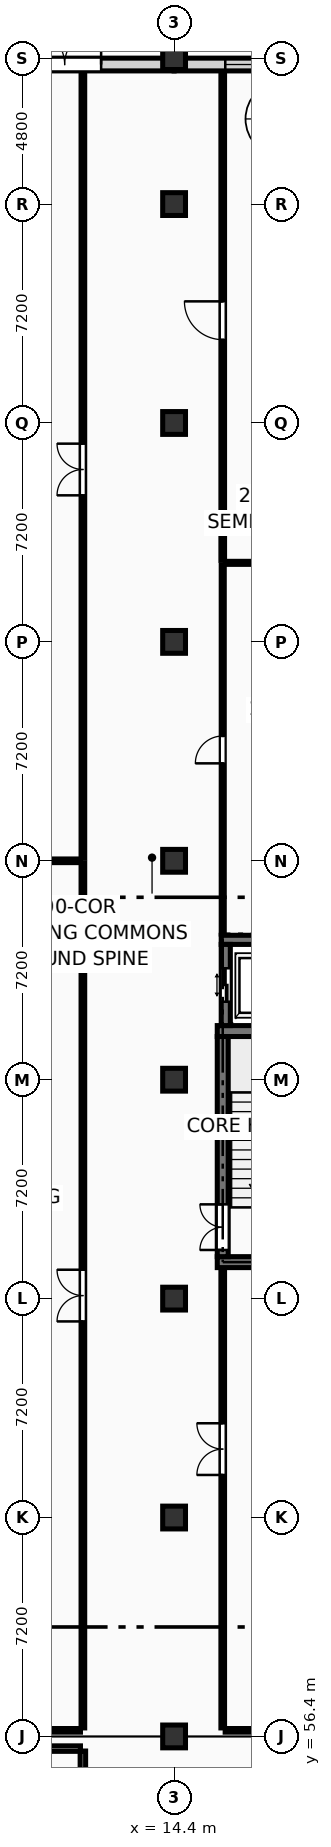
"""IFC4 building model, lengths in metres.
Left out: names, types, materials, properties, quantities, classifications, styles, units other than length and angle.
Written with IfcOpenShell. Run it as: python <this file> out.ifc"""

import sys

from ifc_helpers import new_model, si_unit, direction, frame, frame_2d, origin, origin_2d, place, context, subcontext, project, spatial, rectangle, extrude, element, fill, save


model = new_model("IFC4")
c1 = context("Model", 3, precision=1e-05, world=origin(), true_north=direction((0.0, 1.0)))
c2 = subcontext(c1, "Body", "Model", "MODEL_VIEW")
j1 = project(units=[si_unit("LENGTHUNIT", "METRE"), si_unit("PLANEANGLEUNIT", "RADIAN")], contexts=[c1])
p1 = place(None, origin())
s1 = spatial("IfcSite", under=j1, at=p1, CompositionType="ELEMENT")
p2 = place(p1, origin())
s2 = spatial("IfcBuilding", under=s1, at=p2, CompositionType="ELEMENT")
p3 = place(p2, origin())
s3 = spatial("IfcBuildingStorey", under=s2, at=p3, CompositionType="ELEMENT", Elevation=0.0)
for number, where, z_axis, x_axis in (
    (1, (14.4, 56.4, 0.0), (0.0, 0.0, 1.0), (1.0, 0.0, 0.0)),
    (2, (14.4, 63.6, 0.0), (0.0, 0.0, 1.0), (1.0, 0.0, 0.0)),
    (3, (14.4, 70.8, 0.0), (0.0, 0.0, 1.0), (1.0, 0.0, 0.0)),
    (4, (14.4, 78.0, 0.0), (0.0, 0.0, 1.0), (1.0, 0.0, 0.0)),
    (5, (14.4, 85.2, 0.0), (0.0, 0.0, 1.0), (1.0, 0.0, 0.0)),
    (6, (14.4, 92.4, 0.0), (0.0, 0.0, 1.0), (1.0, 0.0, 0.0)),
    (7, (14.4, 99.6, 0.0), (0.0, 0.0, 1.0), (1.0, 0.0, 0.0)),
    (8, (14.4, 106.8, 0.0), (0.0, 0.0, 1.0), (1.0, 0.0, 0.0)),
    (9, (14.4, 111.6, 0.0), (0.0, 0.0, 1.0), (1.0, 0.0, 0.0)),
):
    element("IfcColumn", number, at=place(p3, frame(where, z_axis=z_axis, x_axis=x_axis)), inside=s3, PredefinedType="COLUMN", context=c2, shape_type="SweptSolid", body=[
        extrude(rectangle(XDim=0.75, YDim=0.75, at=origin_2d()), origin(), (0.0, 0.0, 1.0), 4.5),
    ])
p4 = place(p3, frame((7.2, 111.39, 0.0), z_axis=(0.0, 0.0, 1.0), x_axis=(1.0, 0.0, 0.0)))
e10 = element("IfcWall", 10, at=p4, inside=s3, PredefinedType="SOLIDWALL", context=c2, shape_type="SweptSolid", body=[
    extrude(rectangle(XDim=7.2, YDim=0.42, at=frame_2d((3.6, 0.0))), origin(), (0.0, 0.0, 1.0), 3.62),
])
p5 = place(p4, frame((2.4, 0.0, 0.0)))
e11 = element("IfcOpeningElement", 11, at=p5, cuts=e10, PredefinedType="OPENING", context=c2, shape_type="SweptSolid", body=[
    extrude(rectangle(XDim=2.4, YDim=2.6, at=frame_2d((1.2, 1.3))), frame((0.0, 0.222, 0.0), z_axis=(0.0, -1.0, 0.0), x_axis=(1.0, 0.0, 0.0)), (0.0, 0.0, 1.0), 0.444),
])
p6 = place(p3, frame((14.4, 111.39, 0.0), z_axis=(0.0, 0.0, 1.0), x_axis=(1.0, 0.0, 0.0)))
e12 = element("IfcWall", 12, at=p6, inside=s3, PredefinedType="SOLIDWALL", context=c2, shape_type="SweptSolid", body=[
    extrude(rectangle(XDim=7.2, YDim=0.42, at=frame_2d((3.6, 0.0))), origin(), (0.0, 0.0, 1.0), 3.62),
])
p7 = place(p6, frame((1.683, 0.0, 0.45)))
e13 = element("IfcOpeningElement", 13, at=p7, cuts=e12, PredefinedType="OPENING", context=c2, shape_type="SweptSolid", body=[
    extrude(rectangle(XDim=1.45, YDim=2.8, at=frame_2d((0.725, 1.4))), frame((0.0, 0.222, 0.0), z_axis=(0.0, -1.0, 0.0), x_axis=(1.0, 0.0, 0.0)), (0.0, 0.0, 1.0), 0.444),
])
p8 = place(p6, frame((4.067, 0.0, 0.45)))
e14 = element("IfcOpeningElement", 14, at=p8, cuts=e12, PredefinedType="OPENING", context=c2, shape_type="SweptSolid", body=[
    extrude(rectangle(XDim=1.45, YDim=2.8, at=frame_2d((0.725, 1.4))), frame((0.0, 0.222, 0.0), z_axis=(0.0, -1.0, 0.0), x_axis=(1.0, 0.0, 0.0)), (0.0, 0.0, 1.0), 0.444),
])
for number, where, z_axis, x_axis in (
    (15, (15.82, 72.0, 0.0), (0.0, 0.0, 1.0), (1.0, 0.0, 0.0)),
    (16, (15.82, 79.6, 0.0), (0.0, 0.0, 1.0), (1.0, 0.0, 0.0)),
):
    element("IfcWall", number, at=place(p3, frame(where, z_axis=z_axis, x_axis=x_axis)), inside=s3, PredefinedType="SHEAR", context=c2, shape_type="SweptSolid", body=[
        extrude(rectangle(XDim=4.48, YDim=0.36, at=frame_2d((2.24, 0.0))), origin(), (0.0, 0.0, 1.0), 4.25),
    ])
p9 = place(p3, frame((16.0, 72.18, 0.0), z_axis=(0.0, 0.0, 1.0), x_axis=(0.0, 1.0, 0.0)))
e17 = element("IfcWall", 17, at=p9, inside=s3, PredefinedType="SHEAR", context=c2, shape_type="SweptSolid", body=[
    extrude(rectangle(XDim=7.24, YDim=0.36, at=frame_2d((3.62, 0.0))), origin(), (0.0, 0.0, 1.0), 4.25),
])
p10 = place(p9, frame((0.22, 0.0, 0.0)))
e18 = element("IfcOpeningElement", 18, at=p10, cuts=e17, PredefinedType="OPENING", context=c2, shape_type="SweptSolid", body=[
    extrude(rectangle(XDim=1.5, YDim=2.2, at=frame_2d((0.75, 1.1))), frame((0.0, 0.192, 0.0), z_axis=(0.0, -1.0, 0.0), x_axis=(1.0, 0.0, 0.0)), (0.0, 0.0, 1.0), 0.384),
])
p11 = place(p3, frame((15.95, 82.6, 0.0), z_axis=(0.0, 0.0, 1.0), x_axis=(1.0, 0.0, 0.0)))
e19 = element("IfcWall", 19, at=p11, inside=s3, PredefinedType="SHEAR", context=c2, shape_type="SweptSolid", body=[
    extrude(rectangle(XDim=2.7, YDim=0.3, at=frame_2d((1.35, 0.0))), origin(), (0.0, 0.0, 1.0), 4.25),
])
p12 = place(p3, frame((16.1, 79.78, 0.0), z_axis=(0.0, 0.0, 1.0), x_axis=(0.0, 1.0, 0.0)))
e20 = element("IfcWall", 20, at=p12, inside=s3, PredefinedType="SHEAR", context=c2, shape_type="SweptSolid", body=[
    extrude(rectangle(XDim=2.67, YDim=0.3, at=frame_2d((1.335, 0.0))), origin(), (0.0, 0.0, 1.0), 4.25),
])
p13 = place(p12, frame((0.785, 0.0, 0.0)))
e21 = element("IfcOpeningElement", 21, at=p13, cuts=e20, PredefinedType="OPENING", context=c2, shape_type="SweptSolid", body=[
    extrude(rectangle(XDim=1.1, YDim=2.2, at=frame_2d((0.55, 1.1))), frame((0.0, 0.162, 0.0), z_axis=(0.0, -1.0, 0.0), x_axis=(1.0, 0.0, 0.0)), (0.0, 0.0, 1.0), 0.324),
])
p14 = place(p3, frame((11.4, 48.08, 0.0), z_axis=(0.0, 0.0, 1.0), x_axis=(0.0, 1.0, 0.0)))
e22 = element("IfcWall", 22, at=p14, inside=s3, PredefinedType="PARTITIONING", context=c2, shape_type="SweptSolid", body=[
    extrude(rectangle(XDim=7.84, YDim=0.18, at=frame_2d((3.92, 0.0))), origin(), (0.0, 0.0, 1.0), 4.235),
])
p15 = place(p14, frame((3.17, 0.0, 0.0)))
e23 = element("IfcOpeningElement", 23, at=p15, cuts=e22, PredefinedType="OPENING", context=c2, shape_type="SweptSolid", body=[
    extrude(rectangle(XDim=1.5, YDim=2.25, at=frame_2d((0.75, 1.125))), frame((0.0, 0.102, 0.0), z_axis=(0.0, -1.0, 0.0), x_axis=(1.0, 0.0, 0.0)), (0.0, 0.0, 1.0), 0.204),
])
p16 = place(p3, frame((0.48, 56.0, 0.0), z_axis=(0.0, 0.0, 1.0), x_axis=(1.0, 0.0, 0.0)))
e24 = element("IfcWall", 24, at=p16, inside=s3, PredefinedType="PARTITIONING", context=c2, shape_type="SweptSolid", body=[
    extrude(rectangle(XDim=10.84, YDim=0.18, at=frame_2d((5.42, 0.0))), origin(), (0.0, 0.0, 1.0), 3.485),
])
p17 = place(p3, frame((0.48, 56.6, 0.0), z_axis=(0.0, 0.0, 1.0), x_axis=(1.0, 0.0, 0.0)))
e25 = element("IfcWall", 25, at=p17, inside=s3, PredefinedType="PARTITIONING", context=c2, shape_type="SweptSolid", body=[
    extrude(rectangle(XDim=10.84, YDim=0.12, at=frame_2d((5.42, 0.0))), origin(), (0.0, 0.0, 1.0), 3.485),
])
p18 = place(p3, frame((11.4, 56.68, 0.0), z_axis=(0.0, 0.0, 1.0), x_axis=(0.0, 1.0, 0.0)))
e26 = element("IfcWall", 26, at=p18, inside=s3, PredefinedType="PARTITIONING", context=c2, shape_type="SweptSolid", body=[
    extrude(rectangle(XDim=28.44, YDim=0.12, at=frame_2d((14.22, 0.0))), origin(), (0.0, 0.0, 1.0), 4.235),
])
p19 = place(p18, frame((13.37, 0.0, 0.0)))
e27 = element("IfcOpeningElement", 27, at=p19, cuts=e26, PredefinedType="OPENING", context=c2, shape_type="SweptSolid", body=[
    extrude(rectangle(XDim=1.7, YDim=2.28, at=frame_2d((0.85, 1.14))), frame((0.0, 0.072, 0.0), z_axis=(0.0, -1.0, 0.0), x_axis=(1.0, 0.0, 0.0)), (0.0, 0.0, 1.0), 0.144),
])
p20 = place(p3, frame((0.48, 85.2, 0.0), z_axis=(0.0, 0.0, 1.0), x_axis=(1.0, 0.0, 0.0)))
e28 = element("IfcWall", 28, at=p20, inside=s3, PredefinedType="PARTITIONING", context=c2, shape_type="SweptSolid", body=[
    extrude(rectangle(XDim=10.84, YDim=0.12, at=frame_2d((5.42, 0.0))), origin(), (0.0, 0.0, 1.0), 3.485),
])
p21 = place(p3, frame((11.4, 85.28, 0.0), z_axis=(0.0, 0.0, 1.0), x_axis=(0.0, 1.0, 0.0)))
e29 = element("IfcWall", 29, at=p21, inside=s3, PredefinedType="PARTITIONING", context=c2, shape_type="SweptSolid", body=[
    extrude(rectangle(XDim=25.84, YDim=0.12, at=frame_2d((12.92, 0.0))), origin(), (0.0, 0.0, 1.0), 4.235),
])
p22 = place(p21, frame((11.94, 0.0, 0.0)))
e30 = element("IfcOpeningElement", 30, at=p22, cuts=e29, PredefinedType="OPENING", context=c2, shape_type="SweptSolid", body=[
    extrude(rectangle(XDim=1.7, YDim=2.28, at=frame_2d((0.85, 1.14))), frame((0.0, 0.072, 0.0), z_axis=(0.0, -1.0, 0.0), x_axis=(1.0, 0.0, 0.0)), (0.0, 0.0, 1.0), 0.144),
])
p23 = place(p3, frame((16.0, 56.68, 0.0), z_axis=(0.0, 0.0, 1.0), x_axis=(0.0, 1.0, 0.0)))
e31 = element("IfcWall", 31, at=p23, inside=s3, PredefinedType="PARTITIONING", context=c2, shape_type="SweptSolid", body=[
    extrude(rectangle(XDim=15.1, YDim=0.12, at=frame_2d((7.55, 0.0))), origin(), (0.0, 0.0, 1.0), 4.235),
])
p24 = place(p23, frame((8.32, 0.0, 0.0)))
e32 = element("IfcOpeningElement", 32, at=p24, cuts=e31, PredefinedType="OPENING", context=c2, shape_type="SweptSolid", body=[
    extrude(rectangle(XDim=1.7, YDim=2.28, at=frame_2d((0.85, 1.14))), frame((0.0, 0.072, 0.0), z_axis=(0.0, -1.0, 0.0), x_axis=(1.0, 0.0, 0.0)), (0.0, 0.0, 1.0), 0.144),
])
p25 = place(p3, frame((16.08, 56.6, 0.0), z_axis=(0.0, 0.0, 1.0), x_axis=(1.0, 0.0, 0.0)))
e33 = element("IfcWall", 33, at=p25, inside=s3, PredefinedType="PARTITIONING", context=c2, shape_type="SweptSolid", body=[
    extrude(rectangle(XDim=12.24, YDim=0.12, at=frame_2d((6.12, 0.0))), origin(), (0.0, 0.0, 1.0), 3.485),
])
p26 = place(p3, frame((16.0, 82.79, 0.0), z_axis=(0.0, 0.0, 1.0), x_axis=(0.0, 1.0, 0.0)))
e34 = element("IfcWall", 34, at=p26, inside=s3, PredefinedType="PARTITIONING", context=c2, shape_type="SweptSolid", body=[
    extrude(rectangle(XDim=12.13, YDim=0.1, at=frame_2d((6.065, 0.0))), origin(), (0.0, 0.0, 1.0), 4.235),
])
p27 = place(p26, frame((5.615, 0.0, 0.0)))
e35 = element("IfcOpeningElement", 35, at=p27, cuts=e34, PredefinedType="OPENING", context=c2, shape_type="SweptSolid", body=[
    extrude(rectangle(XDim=0.9, YDim=2.1, at=frame_2d((0.45, 1.05))), frame((0.0, 0.062, 0.0), z_axis=(0.0, -1.0, 0.0), x_axis=(1.0, 0.0, 0.0)), (0.0, 0.0, 1.0), 0.124),
])
p28 = place(p3, frame((16.08, 95.0, 0.0), z_axis=(0.0, 0.0, 1.0), x_axis=(1.0, 0.0, 0.0)))
e36 = element("IfcWall", 36, at=p28, inside=s3, PredefinedType="PARTITIONING", context=c2, shape_type="SweptSolid", body=[
    extrude(rectangle(XDim=5.04, YDim=0.1, at=frame_2d((2.52, 0.0))), origin(), (0.0, 0.0, 1.0), 4.235),
])
p29 = place(p3, frame((16.0, 95.08, 0.0), z_axis=(0.0, 0.0, 1.0), x_axis=(0.0, 1.0, 0.0)))
e37 = element("IfcWall", 37, at=p29, inside=s3, PredefinedType="PARTITIONING", context=c2, shape_type="SweptSolid", body=[
    extrude(rectangle(XDim=16.04, YDim=0.12, at=frame_2d((8.02, 0.0))), origin(), (0.0, 0.0, 1.0), 4.235),
])
p30 = place(p29, frame((7.26, 0.0, 0.0)))
e38 = element("IfcOpeningElement", 38, at=p30, cuts=e37, PredefinedType="OPENING", context=c2, shape_type="SweptSolid", body=[
    extrude(rectangle(XDim=1.26, YDim=2.18, at=frame_2d((0.63, 1.09))), frame((0.0, 0.072, 0.0), z_axis=(0.0, -1.0, 0.0), x_axis=(1.0, 0.0, 0.0)), (0.0, 0.0, 1.0), 0.144),
])
p31 = place(p5, origin())
e39 = element("IfcDoor", 39, at=p31, inside=s3, OperationType="DOUBLE_DOOR_SINGLE_SWING", PredefinedType="GATE", context=c2, shape_type="SweptSolid", body=[
    extrude(rectangle(XDim=2.4, YDim=2.6, at=frame_2d((1.2, 1.3))), frame((0.0, 0.025, 0.0), z_axis=(0.0, -1.0, 0.0), x_axis=(1.0, 0.0, 0.0)), (0.0, 0.0, 1.0), 0.05),
])
fill(e11, e39)
p32 = place(p7, origin())
e40 = element("IfcWindow", 40, at=p32, inside=s3, PartitioningType="SINGLE_PANEL", PredefinedType="WINDOW", context=c2, shape_type="SweptSolid", body=[
    extrude(rectangle(XDim=1.45, YDim=2.8, at=frame_2d((0.725, 1.4))), frame((0.0, 0.03, 0.0), z_axis=(0.0, -1.0, 0.0), x_axis=(1.0, 0.0, 0.0)), (0.0, 0.0, 1.0), 0.06),
])
fill(e13, e40)
p33 = place(p10, origin())
e41 = element("IfcDoor", 41, at=p33, inside=s3, OperationType="DOUBLE_DOOR_SINGLE_SWING", PredefinedType="DOOR", context=c2, shape_type="SweptSolid", body=[
    extrude(rectangle(XDim=1.5, YDim=2.2, at=frame_2d((0.75, 1.1))), frame((0.0, 0.025, 0.0), z_axis=(0.0, -1.0, 0.0), x_axis=(1.0, 0.0, 0.0)), (0.0, 0.0, 1.0), 0.05),
])
fill(e18, e41)
p34 = place(p13, origin())
e42 = element("IfcDoor", 42, at=p34, inside=s3, OperationType="DOUBLE_DOOR_SLIDING", PredefinedType="DOOR", context=c2, shape_type="SweptSolid", body=[
    extrude(rectangle(XDim=1.1, YDim=2.2, at=frame_2d((0.55, 1.1))), frame((0.0, 0.025, 0.0), z_axis=(0.0, -1.0, 0.0), x_axis=(1.0, 0.0, 0.0)), (0.0, 0.0, 1.0), 0.05),
])
fill(e21, e42)
p35 = place(p19, origin())
e43 = element("IfcDoor", 43, at=p35, inside=s3, OperationType="DOUBLE_DOOR_SINGLE_SWING", PredefinedType="DOOR", context=c2, shape_type="SweptSolid", body=[
    extrude(rectangle(XDim=1.7, YDim=2.28, at=frame_2d((0.85, 1.14))), frame((0.0, 0.025, 0.0), z_axis=(0.0, -1.0, 0.0), x_axis=(1.0, 0.0, 0.0)), (0.0, 0.0, 1.0), 0.05),
])
fill(e27, e43)
p36 = place(p22, origin())
e44 = element("IfcDoor", 44, at=p36, inside=s3, OperationType="DOUBLE_DOOR_SINGLE_SWING", PredefinedType="DOOR", context=c2, shape_type="SweptSolid", body=[
    extrude(rectangle(XDim=1.7, YDim=2.28, at=frame_2d((0.85, 1.14))), frame((0.0, 0.025, 0.0), z_axis=(0.0, -1.0, 0.0), x_axis=(1.0, 0.0, 0.0)), (0.0, 0.0, 1.0), 0.05),
])
fill(e30, e44)
p37 = place(p24, origin())
e45 = element("IfcDoor", 45, at=p37, inside=s3, OperationType="DOUBLE_DOOR_SINGLE_SWING", PredefinedType="DOOR", context=c2, shape_type="SweptSolid", body=[
    extrude(rectangle(XDim=1.7, YDim=2.28, at=frame_2d((0.85, 1.14))), frame((0.0, 0.025, 0.0), z_axis=(0.0, -1.0, 0.0), x_axis=(1.0, 0.0, 0.0)), (0.0, 0.0, 1.0), 0.05),
])
fill(e32, e45)
p38 = place(p27, origin())
e46 = element("IfcDoor", 46, at=p38, inside=s3, OperationType="SINGLE_SWING_LEFT", PredefinedType="DOOR", context=c2, shape_type="SweptSolid", body=[
    extrude(rectangle(XDim=0.9, YDim=2.1, at=frame_2d((0.45, 1.05))), frame((0.0, 0.025, 0.0), z_axis=(0.0, -1.0, 0.0), x_axis=(1.0, 0.0, 0.0)), (0.0, 0.0, 1.0), 0.05),
])
fill(e35, e46)
p39 = place(p30, origin())
e47 = element("IfcDoor", 47, at=p39, inside=s3, OperationType="SINGLE_SWING_RIGHT", PredefinedType="DOOR", context=c2, shape_type="SweptSolid", body=[
    extrude(rectangle(XDim=1.26, YDim=2.18, at=frame_2d((0.63, 1.09))), frame((0.0, 0.025, 0.0), z_axis=(0.0, -1.0, 0.0), x_axis=(1.0, 0.0, 0.0)), (0.0, 0.0, 1.0), 0.05),
])
fill(e38, e47)
save(model, sys.argv[1])
